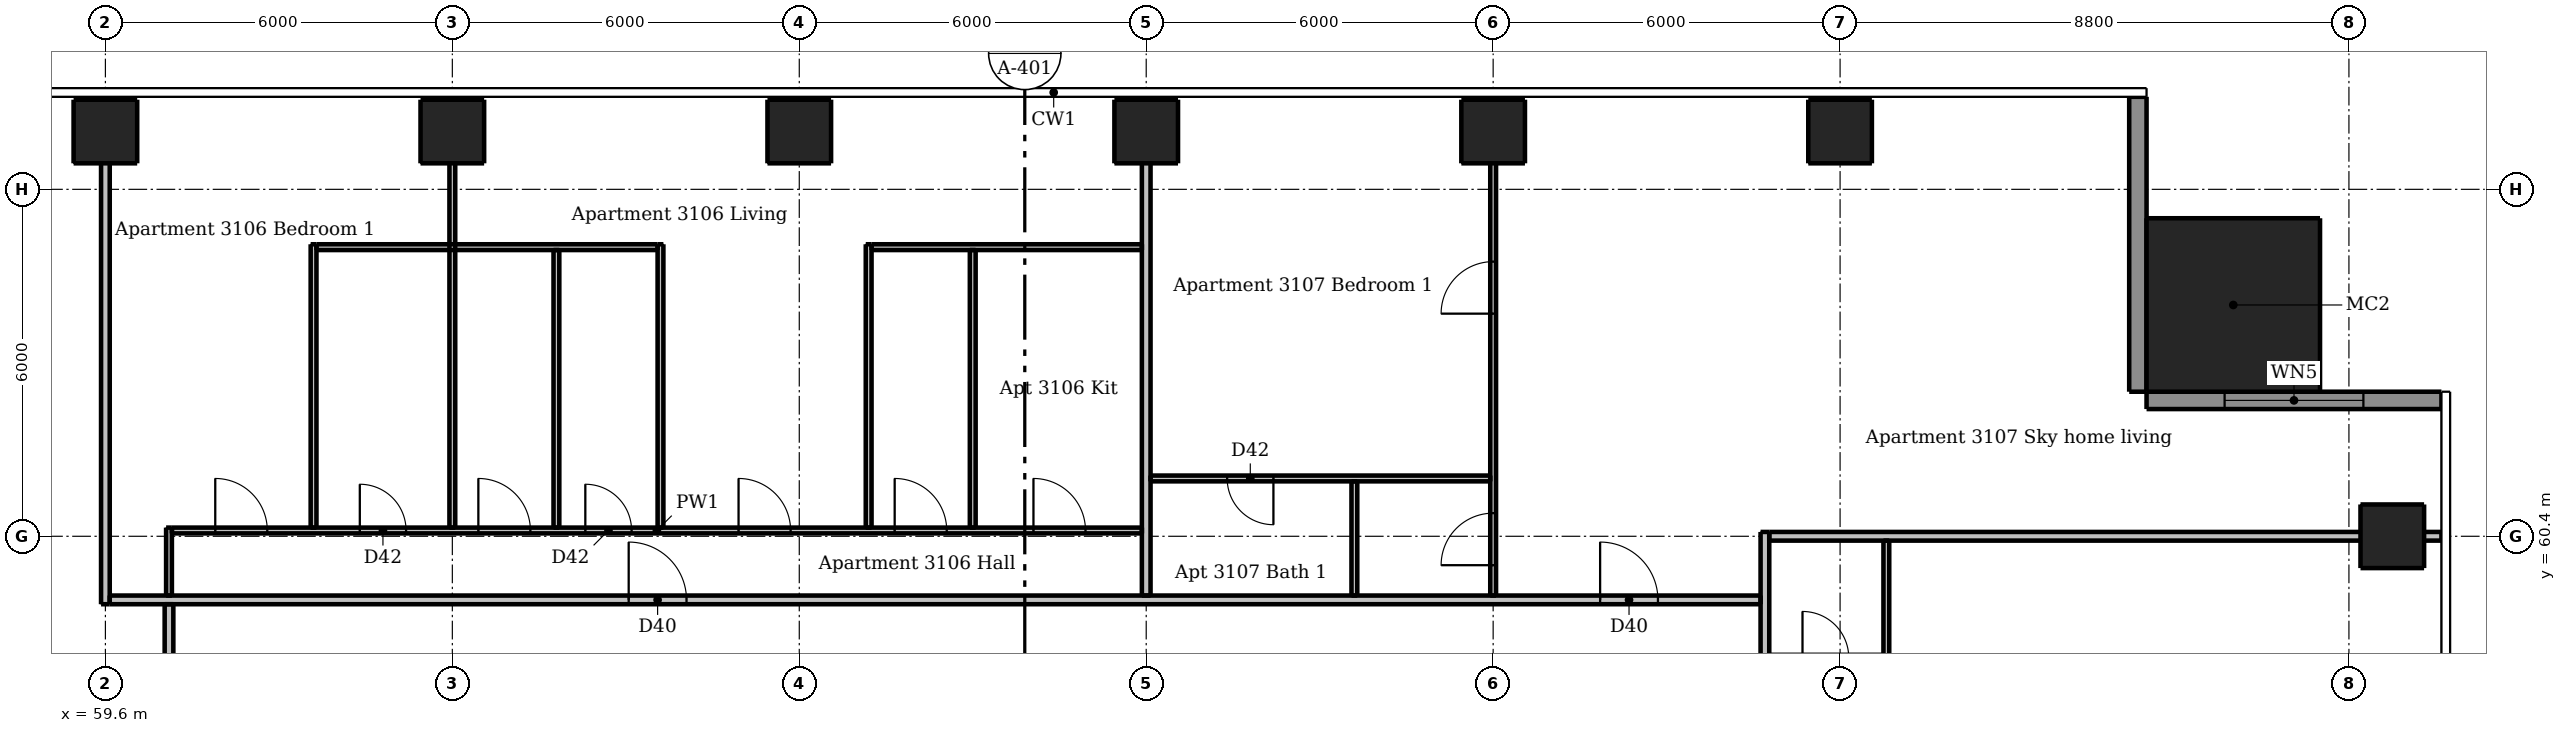
"""IFC4 building model, lengths in metres.
Left out: names, types, materials, properties, quantities, classifications, styles, units other than length and angle.
Written with IfcOpenShell. Run it as: python <this file> out.ifc"""

import sys

from ifc_helpers import new_model, si_unit, direction, frame, frame_2d, origin, origin_2d, place, context, subcontext, project, spatial, rectangle, extrude, element, fill, save


model = new_model("IFC4")
c1 = context("Model", 3, precision=1e-05, world=origin(), true_north=direction((0.0, 1.0)))
c2 = subcontext(c1, "Body", "Model", "MODEL_VIEW")
j1 = project(units=[si_unit("LENGTHUNIT", "METRE"), si_unit("PLANEANGLEUNIT", "RADIAN")], contexts=[c1])
p1 = place(None, origin())
s1 = spatial("IfcSite", under=j1, at=p1, CompositionType="ELEMENT")
p2 = place(p1, origin())
s2 = spatial("IfcBuilding", under=s1, at=p2, CompositionType="ELEMENT")
p3 = place(p2, frame((0.0, 0.0, 115.0)))
s3 = spatial("IfcBuildingStorey", under=s2, at=p3, CompositionType="ELEMENT", Elevation=115.0)
for number, where, z_axis, x_axis in (
    (1, (99.15, 60.4, 0.0), (0.0, 0.0, 1.0), (1.0, 0.0, 0.0)),
    (2, (59.6, 67.4, 0.0), (0.0, 0.0, 1.0), (1.0, 0.0, 0.0)),
    (3, (65.6, 67.4, 0.0), (0.0, 0.0, 1.0), (1.0, 0.0, 0.0)),
    (4, (71.6, 67.4, 0.0), (0.0, 0.0, 1.0), (1.0, 0.0, 0.0)),
    (5, (77.6, 67.4, 0.0), (0.0, 0.0, 1.0), (1.0, 0.0, 0.0)),
    (6, (83.6, 67.4, 0.0), (0.0, 0.0, 1.0), (1.0, 0.0, 0.0)),
    (7, (89.6, 67.4, 0.0), (0.0, 0.0, 1.0), (1.0, 0.0, 0.0)),
):
    element("IfcColumn", number, at=place(p3, frame(where, z_axis=z_axis, x_axis=x_axis)), inside=s3, PredefinedType="COLUMN", context=c2, shape_type="SweptSolid", body=[
        extrude(rectangle(XDim=1.1, YDim=1.1, at=origin_2d()), origin(), (0.0, 0.0, 1.0), 3.05),
    ])
p4 = place(p3, frame((96.4, 64.4, 0.0), z_axis=(0.0, 0.0, 1.0), x_axis=(1.0, 0.0, 0.0)))
e8 = element("IfcColumn", 8, at=p4, inside=s3, PredefinedType="COLUMN", context=c2, shape_type="SweptSolid", body=[
    extrude(rectangle(XDim=3.0, YDim=3.0, at=origin_2d()), origin(), (0.0, 0.0, 1.0), 3.3),
])
p5 = place(p3, frame((100.0, 62.75, 0.0), z_axis=(0.0, 0.0, 1.0), x_axis=(-1.0, 0.0, 0.0)))
e9 = element("IfcWall", 9, at=p5, inside=s3, PredefinedType="SOLIDWALL", context=c2, shape_type="SweptSolid", body=[
    extrude(rectangle(XDim=5.1, YDim=0.3, at=frame_2d((2.55, 0.0))), origin(), (0.0, 0.0, 1.0), 3.05),
])
p6 = place(p5, frame((1.35, 0.0, 0.15)))
e10 = element("IfcOpeningElement", 10, at=p6, cuts=e9, PredefinedType="OPENING", context=c2, shape_type="SweptSolid", body=[
    extrude(rectangle(XDim=2.4, YDim=2.1, at=frame_2d((1.2, 1.05))), frame((0.0, 0.16, 0.0), z_axis=(0.0, -1.0, 0.0), x_axis=(1.0, 0.0, 0.0)), (0.0, 0.0, 1.0), 0.32),
])
p7 = place(p3, frame((94.75, 62.9, 0.0), z_axis=(0.0, 0.0, 1.0), x_axis=(0.0, 1.0, 0.0)))
e11 = element("IfcWall", 11, at=p7, inside=s3, PredefinedType="SOLIDWALL", context=c2, shape_type="SweptSolid", body=[
    extrude(rectangle(XDim=5.1, YDim=0.3, at=frame_2d((2.55, 0.0))), origin(), (0.0, 0.0, 1.0), 3.05),
])
p8 = place(p3, frame((60.7, 59.375, 0.0), z_axis=(0.0, 0.0, 1.0), x_axis=(0.0, 1.0, 0.0)))
e12 = element("IfcWall", 12, at=p8, inside=s3, PredefinedType="PARTITIONING", context=c2, shape_type="SweptSolid", body=[
    extrude(rectangle(XDim=1.175, YDim=0.1, at=frame_2d((0.587, 0.0))), origin(), (0.0, 0.0, 1.0), 3.05),
])
p9 = place(p3, frame((63.2, 60.55, 0.0), z_axis=(0.0, 0.0, 1.0), x_axis=(0.0, 1.0, 0.0)))
e13 = element("IfcWall", 13, at=p9, inside=s3, PredefinedType="PARTITIONING", context=c2, shape_type="SweptSolid", body=[
    extrude(rectangle(XDim=4.9, YDim=0.1, at=frame_2d((2.45, 0.0))), origin(), (0.0, 0.0, 1.0), 3.05),
])
p10 = place(p3, frame((65.6, 60.55, 0.0), z_axis=(0.0, 0.0, 1.0), x_axis=(0.0, 1.0, 0.0)))
e14 = element("IfcWall", 14, at=p10, inside=s3, PredefinedType="PARTITIONING", context=c2, shape_type="SweptSolid", body=[
    extrude(rectangle(XDim=7.45, YDim=0.1, at=frame_2d((3.725, 0.0))), origin(), (0.0, 0.0, 1.0), 2.516),
])
p11 = place(p3, frame((67.4, 60.55, 0.0), z_axis=(0.0, 0.0, 1.0), x_axis=(0.0, 1.0, 0.0)))
e15 = element("IfcWall", 15, at=p11, inside=s3, PredefinedType="PARTITIONING", context=c2, shape_type="SweptSolid", body=[
    extrude(rectangle(XDim=4.8, YDim=0.1, at=frame_2d((2.4, 0.0))), origin(), (0.0, 0.0, 1.0), 3.05),
])
for number, where, z_axis, x_axis in (
    (16, (69.2, 60.55, 0.0), (0.0, 0.0, 1.0), (0.0, 1.0, 0.0)),
    (17, (72.8, 60.55, 0.0), (0.0, 0.0, 1.0), (0.0, 1.0, 0.0)),
):
    element("IfcWall", number, at=place(p3, frame(where, z_axis=z_axis, x_axis=x_axis)), inside=s3, PredefinedType="PARTITIONING", context=c2, shape_type="SweptSolid", body=[
        extrude(rectangle(XDim=4.9, YDim=0.1, at=frame_2d((2.45, 0.0))), origin(), (0.0, 0.0, 1.0), 3.05),
    ])
p12 = place(p3, frame((74.6, 60.55, 0.0), z_axis=(0.0, 0.0, 1.0), x_axis=(0.0, 1.0, 0.0)))
e18 = element("IfcWall", 18, at=p12, inside=s3, PredefinedType="PARTITIONING", context=c2, shape_type="SweptSolid", body=[
    extrude(rectangle(XDim=4.8, YDim=0.1, at=frame_2d((2.4, 0.0))), origin(), (0.0, 0.0, 1.0), 3.05),
])
p13 = place(p3, frame((81.2, 59.375, 0.0), z_axis=(0.0, 0.0, 1.0), x_axis=(0.0, 1.0, 0.0)))
e19 = element("IfcWall", 19, at=p13, inside=s3, PredefinedType="PARTITIONING", context=c2, shape_type="SweptSolid", body=[
    extrude(rectangle(XDim=1.975, YDim=0.1, at=frame_2d((0.988, 0.0))), origin(), (0.0, 0.0, 1.0), 3.05),
])
p14 = place(p3, frame((83.6, 59.375, 0.0), z_axis=(0.0, 0.0, 1.0), x_axis=(0.0, 1.0, 0.0)))
e20 = element("IfcWall", 20, at=p14, inside=s3, PredefinedType="PARTITIONING", context=c2, shape_type="SweptSolid", body=[
    extrude(rectangle(XDim=8.625, YDim=0.1, at=frame_2d((4.312, 0.0))), origin(), (0.0, 0.0, 1.0), 2.516),
])
p15 = place(p14, frame((0.525, 0.0, 0.0)))
e21 = element("IfcOpeningElement", 21, at=p15, cuts=e20, PredefinedType="OPENING", context=c2, shape_type="SweptSolid", body=[
    extrude(rectangle(XDim=0.9, YDim=2.1, at=frame_2d((0.45, 1.05))), frame((0.0, 0.06, 0.0), z_axis=(0.0, -1.0, 0.0), x_axis=(1.0, 0.0, 0.0)), (0.0, 0.0, 1.0), 0.12),
])
p16 = place(p14, frame((4.875, 0.0, 0.0)))
e22 = element("IfcOpeningElement", 22, at=p16, cuts=e20, PredefinedType="OPENING", context=c2, shape_type="SweptSolid", body=[
    extrude(rectangle(XDim=0.9, YDim=2.1, at=frame_2d((0.45, 1.05))), frame((0.0, 0.06, 0.0), z_axis=(0.0, -1.0, 0.0), x_axis=(1.0, 0.0, 0.0)), (0.0, 0.0, 1.0), 0.12),
])
p17 = place(p3, frame((90.4, 58.25, 0.0), z_axis=(0.0, 0.0, 1.0), x_axis=(0.0, 1.0, 0.0)))
e23 = element("IfcWall", 23, at=p17, inside=s3, PredefinedType="PARTITIONING", context=c2, shape_type="SweptSolid", body=[
    extrude(rectangle(XDim=2.075, YDim=0.1, at=frame_2d((1.038, 0.0))), origin(), (0.0, 0.0, 1.0), 3.05),
])
p18 = place(p3, frame((63.25, 65.4, 0.0), z_axis=(0.0, 0.0, 1.0), x_axis=(1.0, 0.0, 0.0)))
e24 = element("IfcWall", 24, at=p18, inside=s3, PredefinedType="PARTITIONING", context=c2, shape_type="SweptSolid", body=[
    extrude(rectangle(XDim=5.9, YDim=0.1, at=frame_2d((2.95, 0.0))), origin(), (0.0, 0.0, 1.0), 3.05),
])
p19 = place(p3, frame((72.85, 65.4, 0.0), z_axis=(0.0, 0.0, 1.0), x_axis=(1.0, 0.0, 0.0)))
e25 = element("IfcWall", 25, at=p19, inside=s3, PredefinedType="PARTITIONING", context=c2, shape_type="SweptSolid", body=[
    extrude(rectangle(XDim=4.675, YDim=0.1, at=frame_2d((2.337, 0.0))), origin(), (0.0, 0.0, 1.0), 3.05),
])
p20 = place(p3, frame((83.55, 61.4, 0.0), z_axis=(0.0, 0.0, 1.0), x_axis=(-1.0, 0.0, 0.0)))
e26 = element("IfcWall", 26, at=p20, inside=s3, PredefinedType="PARTITIONING", context=c2, shape_type="SweptSolid", body=[
    extrude(rectangle(XDim=5.875, YDim=0.1, at=frame_2d((2.938, 0.0))), origin(), (0.0, 0.0, 1.0), 3.05),
])
p21 = place(p20, frame((3.75, 0.0, 0.0)))
e27 = element("IfcOpeningElement", 27, at=p21, cuts=e26, PredefinedType="OPENING", context=c2, shape_type="SweptSolid", body=[
    extrude(rectangle(XDim=0.8, YDim=2.1, at=frame_2d((0.4, 1.05))), frame((0.0, 0.06, 0.0), z_axis=(0.0, -1.0, 0.0), x_axis=(1.0, 0.0, 0.0)), (0.0, 0.0, 1.0), 0.12),
])
p22 = place(p3, frame((60.75, 60.5, 0.0), z_axis=(0.0, 0.0, 1.0), x_axis=(1.0, 0.0, 0.0)))
e28 = element("IfcWall", 28, at=p22, inside=s3, PredefinedType="PARTITIONING", context=c2, shape_type="SweptSolid", body=[
    extrude(rectangle(XDim=16.775, YDim=0.1, at=frame_2d((8.387, 0.0))), origin(), (0.0, 0.0, 1.0), 3.05),
])
p23 = place(p22, frame((9.8, 0.0, 0.0)))
e29 = element("IfcOpeningElement", 29, at=p23, cuts=e28, PredefinedType="OPENING", context=c2, shape_type="SweptSolid", body=[
    extrude(rectangle(XDim=0.9, YDim=2.1, at=frame_2d((0.45, 1.05))), frame((0.0, 0.06, 0.0), z_axis=(0.0, -1.0, 0.0), x_axis=(1.0, 0.0, 0.0)), (0.0, 0.0, 1.0), 0.12),
])
p24 = place(p22, frame((14.9, 0.0, 0.0)))
e30 = element("IfcOpeningElement", 30, at=p24, cuts=e28, PredefinedType="OPENING", context=c2, shape_type="SweptSolid", body=[
    extrude(rectangle(XDim=0.9, YDim=2.1, at=frame_2d((0.45, 1.05))), frame((0.0, 0.06, 0.0), z_axis=(0.0, -1.0, 0.0), x_axis=(1.0, 0.0, 0.0)), (0.0, 0.0, 1.0), 0.12),
])
p25 = place(p22, frame((12.5, 0.0, 0.0)))
e31 = element("IfcOpeningElement", 31, at=p25, cuts=e28, PredefinedType="OPENING", context=c2, shape_type="SweptSolid", body=[
    extrude(rectangle(XDim=0.9, YDim=2.1, at=frame_2d((0.45, 1.05))), frame((0.0, 0.06, 0.0), z_axis=(0.0, -1.0, 0.0), x_axis=(1.0, 0.0, 0.0)), (0.0, 0.0, 1.0), 0.12),
])
p26 = place(p22, frame((5.3, 0.0, 0.0)))
e32 = element("IfcOpeningElement", 32, at=p26, cuts=e28, PredefinedType="OPENING", context=c2, shape_type="SweptSolid", body=[
    extrude(rectangle(XDim=0.9, YDim=2.1, at=frame_2d((0.45, 1.05))), frame((0.0, 0.06, 0.0), z_axis=(0.0, -1.0, 0.0), x_axis=(1.0, 0.0, 0.0)), (0.0, 0.0, 1.0), 0.12),
])
p27 = place(p22, frame((7.15, 0.0, 0.0)))
e33 = element("IfcOpeningElement", 33, at=p27, cuts=e28, PredefinedType="OPENING", context=c2, shape_type="SweptSolid", body=[
    extrude(rectangle(XDim=0.8, YDim=2.1, at=frame_2d((0.4, 1.05))), frame((0.0, 0.06, 0.0), z_axis=(0.0, -1.0, 0.0), x_axis=(1.0, 0.0, 0.0)), (0.0, 0.0, 1.0), 0.12),
])
p28 = place(p22, frame((0.75, 0.0, 0.0)))
e34 = element("IfcOpeningElement", 34, at=p28, cuts=e28, PredefinedType="OPENING", context=c2, shape_type="SweptSolid", body=[
    extrude(rectangle(XDim=0.9, YDim=2.1, at=frame_2d((0.45, 1.05))), frame((0.0, 0.06, 0.0), z_axis=(0.0, -1.0, 0.0), x_axis=(1.0, 0.0, 0.0)), (0.0, 0.0, 1.0), 0.12),
])
p29 = place(p22, frame((3.25, 0.0, 0.0)))
e35 = element("IfcOpeningElement", 35, at=p29, cuts=e28, PredefinedType="OPENING", context=c2, shape_type="SweptSolid", body=[
    extrude(rectangle(XDim=0.8, YDim=2.1, at=frame_2d((0.4, 1.05))), frame((0.0, 0.06, 0.0), z_axis=(0.0, -1.0, 0.0), x_axis=(1.0, 0.0, 0.0)), (0.0, 0.0, 1.0), 0.12),
])
p30 = place(p3, frame((59.6, 59.225, 0.0), z_axis=(0.0, 0.0, 1.0), x_axis=(0.0, 1.0, 0.0)))
e36 = element("IfcWall", 36, at=p30, inside=s3, PredefinedType="PARTITIONING", context=c2, shape_type="SweptSolid", body=[
    extrude(rectangle(XDim=8.775, YDim=0.15, at=frame_2d((4.387, 0.0))), origin(), (0.0, 0.0, 1.0), 2.51),
])
p31 = place(p3, frame((60.7, 30.325, 0.0), z_axis=(0.0, 0.0, 1.0), x_axis=(0.0, 1.0, 0.0)))
e37 = element("IfcWall", 37, at=p31, inside=s3, PredefinedType="PARTITIONING", context=c2, shape_type="SweptSolid", body=[
    extrude(rectangle(XDim=28.9, YDim=0.15, at=frame_2d((14.45, 0.0))), origin(), (0.0, 0.0, 1.0), 3.05),
])
p32 = place(p31, frame((9.225, 0.0, 0.0)))
e38 = element("IfcOpeningElement", 38, at=p32, cuts=e37, PredefinedType="OPENING", context=c2, shape_type="SweptSolid", body=[
    extrude(rectangle(XDim=1.0, YDim=2.1, at=frame_2d((0.5, 1.05))), frame((0.0, 0.085, 0.0), z_axis=(0.0, -1.0, 0.0), x_axis=(1.0, 0.0, 0.0)), (0.0, 0.0, 1.0), 0.17),
])
p33 = place(p31, frame((26.025, 0.0, 0.0)))
e39 = element("IfcOpeningElement", 39, at=p33, cuts=e37, PredefinedType="OPENING", context=c2, shape_type="SweptSolid", body=[
    extrude(rectangle(XDim=1.0, YDim=2.1, at=frame_2d((0.5, 1.05))), frame((0.0, 0.085, 0.0), z_axis=(0.0, -1.0, 0.0), x_axis=(1.0, 0.0, 0.0)), (0.0, 0.0, 1.0), 0.17),
])
p34 = place(p3, frame((77.6, 59.375, 0.0), z_axis=(0.0, 0.0, 1.0), x_axis=(0.0, 1.0, 0.0)))
e40 = element("IfcWall", 40, at=p34, inside=s3, PredefinedType="PARTITIONING", context=c2, shape_type="SweptSolid", body=[
    extrude(rectangle(XDim=8.625, YDim=0.15, at=frame_2d((4.312, 0.0))), origin(), (0.0, 0.0, 1.0), 2.516),
])
p35 = place(p3, frame((88.3, 60.475, 0.0), z_axis=(0.0, 0.0, 1.0), x_axis=(0.0, -1.0, 0.0)))
e41 = element("IfcWall", 41, at=p35, inside=s3, PredefinedType="PARTITIONING", context=c2, shape_type="SweptSolid", body=[
    extrude(rectangle(XDim=28.7, YDim=0.15, at=frame_2d((14.35, 0.0))), origin(), (0.0, 0.0, 1.0), 3.05),
])
p36 = place(p35, frame((27.425, 0.0, 0.0)))
e42 = element("IfcOpeningElement", 42, at=p36, cuts=e41, PredefinedType="OPENING", context=c2, shape_type="SweptSolid", body=[
    extrude(rectangle(XDim=1.0, YDim=2.1, at=frame_2d((0.5, 1.05))), frame((0.0, 0.085, 0.0), z_axis=(0.0, -1.0, 0.0), x_axis=(1.0, 0.0, 0.0)), (0.0, 0.0, 1.0), 0.17),
])
p37 = place(p35, frame((13.075, 0.0, 0.0)))
e43 = element("IfcOpeningElement", 43, at=p37, cuts=e41, PredefinedType="OPENING", context=c2, shape_type="SweptSolid", body=[
    extrude(rectangle(XDim=1.0, YDim=2.1, at=frame_2d((0.5, 1.05))), frame((0.0, 0.085, 0.0), z_axis=(0.0, -1.0, 0.0), x_axis=(1.0, 0.0, 0.0)), (0.0, 0.0, 1.0), 0.17),
])
p38 = place(p35, frame((2.575, 0.0, 0.0)))
e44 = element("IfcOpeningElement", 44, at=p38, cuts=e41, PredefinedType="OPENING", context=c2, shape_type="SweptSolid", body=[
    extrude(rectangle(XDim=1.0, YDim=2.1, at=frame_2d((0.5, 1.05))), frame((0.0, 0.085, 0.0), z_axis=(0.0, -1.0, 0.0), x_axis=(1.0, 0.0, 0.0)), (0.0, 0.0, 1.0), 0.17),
])
p39 = place(p3, frame((88.375, 60.4, 0.0), z_axis=(0.0, 0.0, 1.0), x_axis=(1.0, 0.0, 0.0)))
e45 = element("IfcWall", 45, at=p39, inside=s3, PredefinedType="PARTITIONING", context=c2, shape_type="SweptSolid", body=[
    extrude(rectangle(XDim=11.625, YDim=0.15, at=frame_2d((5.812, 0.0))), origin(), (0.0, 0.0, 1.0), 2.516),
])
p40 = place(p3, frame((59.675, 59.3, 0.0), z_axis=(0.0, 0.0, 1.0), x_axis=(1.0, 0.0, 0.0)))
e46 = element("IfcWall", 46, at=p40, inside=s3, PredefinedType="PARTITIONING", context=c2, shape_type="SweptSolid", body=[
    extrude(rectangle(XDim=28.55, YDim=0.15, at=frame_2d((14.275, 0.0))), origin(), (0.0, 0.0, 1.0), 3.05),
])
p41 = place(p40, frame((8.975, 0.0, 0.0)))
e47 = element("IfcOpeningElement", 47, at=p41, cuts=e46, PredefinedType="OPENING", context=c2, shape_type="SweptSolid", body=[
    extrude(rectangle(XDim=1.0, YDim=2.1, at=frame_2d((0.5, 1.05))), frame((0.0, 0.085, 0.0), z_axis=(0.0, -1.0, 0.0), x_axis=(1.0, 0.0, 0.0)), (0.0, 0.0, 1.0), 0.17),
])
p42 = place(p40, frame((25.775, 0.0, 0.0)))
e48 = element("IfcOpeningElement", 48, at=p42, cuts=e46, PredefinedType="OPENING", context=c2, shape_type="SweptSolid", body=[
    extrude(rectangle(XDim=1.0, YDim=2.1, at=frame_2d((0.5, 1.05))), frame((0.0, 0.085, 0.0), z_axis=(0.0, -1.0, 0.0), x_axis=(1.0, 0.0, 0.0)), (0.0, 0.0, 1.0), 0.17),
])
p43 = place(p6, origin())
e49 = element("IfcWindow", 49, at=p43, inside=s3, PartitioningType="DOUBLE_PANEL_VERTICAL", PredefinedType="WINDOW", context=c2, shape_type="SweptSolid", body=[
    extrude(rectangle(XDim=2.4, YDim=2.1, at=frame_2d((1.2, 1.05))), frame((0.0, 0.03, 0.0), z_axis=(0.0, -1.0, 0.0), x_axis=(1.0, 0.0, 0.0)), (0.0, 0.0, 1.0), 0.06),
])
fill(e10, e49)
p44 = place(p41, origin())
e50 = element("IfcDoor", 50, at=p44, inside=s3, OperationType="SINGLE_SWING_LEFT", PredefinedType="DOOR", context=c2, shape_type="SweptSolid", body=[
    extrude(rectangle(XDim=1.0, YDim=2.1, at=frame_2d((0.5, 1.05))), frame((0.0, 0.025, 0.0), z_axis=(0.0, -1.0, 0.0), x_axis=(1.0, 0.0, 0.0)), (0.0, 0.0, 1.0), 0.05),
])
fill(e47, e50)
p45 = place(p23, origin())
e51 = element("IfcDoor", 51, at=p45, inside=s3, OperationType="SINGLE_SWING_LEFT", PredefinedType="DOOR", context=c2, shape_type="SweptSolid", body=[
    extrude(rectangle(XDim=0.9, YDim=2.1, at=frame_2d((0.45, 1.05))), frame((0.0, 0.025, 0.0), z_axis=(0.0, -1.0, 0.0), x_axis=(1.0, 0.0, 0.0)), (0.0, 0.0, 1.0), 0.05),
])
fill(e29, e51)
p46 = place(p24, origin())
e52 = element("IfcDoor", 52, at=p46, inside=s3, OperationType="SINGLE_SWING_LEFT", PredefinedType="DOOR", context=c2, shape_type="SweptSolid", body=[
    extrude(rectangle(XDim=0.9, YDim=2.1, at=frame_2d((0.45, 1.05))), frame((0.0, 0.025, 0.0), z_axis=(0.0, -1.0, 0.0), x_axis=(1.0, 0.0, 0.0)), (0.0, 0.0, 1.0), 0.05),
])
fill(e30, e52)
p47 = place(p25, origin())
e53 = element("IfcDoor", 53, at=p47, inside=s3, OperationType="SINGLE_SWING_LEFT", PredefinedType="DOOR", context=c2, shape_type="SweptSolid", body=[
    extrude(rectangle(XDim=0.9, YDim=2.1, at=frame_2d((0.45, 1.05))), frame((0.0, 0.025, 0.0), z_axis=(0.0, -1.0, 0.0), x_axis=(1.0, 0.0, 0.0)), (0.0, 0.0, 1.0), 0.05),
])
fill(e31, e53)
p48 = place(p26, origin())
e54 = element("IfcDoor", 54, at=p48, inside=s3, OperationType="SINGLE_SWING_LEFT", PredefinedType="DOOR", context=c2, shape_type="SweptSolid", body=[
    extrude(rectangle(XDim=0.9, YDim=2.1, at=frame_2d((0.45, 1.05))), frame((0.0, 0.025, 0.0), z_axis=(0.0, -1.0, 0.0), x_axis=(1.0, 0.0, 0.0)), (0.0, 0.0, 1.0), 0.05),
])
fill(e32, e54)
p49 = place(p27, origin())
e55 = element("IfcDoor", 55, at=p49, inside=s3, OperationType="SINGLE_SWING_LEFT", PredefinedType="DOOR", context=c2, shape_type="SweptSolid", body=[
    extrude(rectangle(XDim=0.8, YDim=2.1, at=frame_2d((0.4, 1.05))), frame((0.0, 0.025, 0.0), z_axis=(0.0, -1.0, 0.0), x_axis=(1.0, 0.0, 0.0)), (0.0, 0.0, 1.0), 0.05),
])
fill(e33, e55)
p50 = place(p28, origin())
e56 = element("IfcDoor", 56, at=p50, inside=s3, OperationType="SINGLE_SWING_LEFT", PredefinedType="DOOR", context=c2, shape_type="SweptSolid", body=[
    extrude(rectangle(XDim=0.9, YDim=2.1, at=frame_2d((0.45, 1.05))), frame((0.0, 0.025, 0.0), z_axis=(0.0, -1.0, 0.0), x_axis=(1.0, 0.0, 0.0)), (0.0, 0.0, 1.0), 0.05),
])
fill(e34, e56)
p51 = place(p29, origin())
e57 = element("IfcDoor", 57, at=p51, inside=s3, OperationType="SINGLE_SWING_LEFT", PredefinedType="DOOR", context=c2, shape_type="SweptSolid", body=[
    extrude(rectangle(XDim=0.8, YDim=2.1, at=frame_2d((0.4, 1.05))), frame((0.0, 0.025, 0.0), z_axis=(0.0, -1.0, 0.0), x_axis=(1.0, 0.0, 0.0)), (0.0, 0.0, 1.0), 0.05),
])
fill(e35, e57)
p52 = place(p42, origin())
e58 = element("IfcDoor", 58, at=p52, inside=s3, OperationType="SINGLE_SWING_LEFT", PredefinedType="DOOR", context=c2, shape_type="SweptSolid", body=[
    extrude(rectangle(XDim=1.0, YDim=2.1, at=frame_2d((0.5, 1.05))), frame((0.0, 0.025, 0.0), z_axis=(0.0, -1.0, 0.0), x_axis=(1.0, 0.0, 0.0)), (0.0, 0.0, 1.0), 0.05),
])
fill(e48, e58)
p53 = place(p15, origin())
e59 = element("IfcDoor", 59, at=p53, inside=s3, OperationType="SINGLE_SWING_LEFT", PredefinedType="DOOR", context=c2, shape_type="SweptSolid", body=[
    extrude(rectangle(XDim=0.9, YDim=2.1, at=frame_2d((0.45, 1.05))), frame((0.0, 0.025, 0.0), z_axis=(0.0, -1.0, 0.0), x_axis=(1.0, 0.0, 0.0)), (0.0, 0.0, 1.0), 0.05),
])
fill(e21, e59)
p54 = place(p16, origin())
e60 = element("IfcDoor", 60, at=p54, inside=s3, OperationType="SINGLE_SWING_LEFT", PredefinedType="DOOR", context=c2, shape_type="SweptSolid", body=[
    extrude(rectangle(XDim=0.9, YDim=2.1, at=frame_2d((0.45, 1.05))), frame((0.0, 0.025, 0.0), z_axis=(0.0, -1.0, 0.0), x_axis=(1.0, 0.0, 0.0)), (0.0, 0.0, 1.0), 0.05),
])
fill(e22, e60)
p55 = place(p21, origin())
e61 = element("IfcDoor", 61, at=p55, inside=s3, OperationType="SINGLE_SWING_LEFT", PredefinedType="DOOR", context=c2, shape_type="SweptSolid", body=[
    extrude(rectangle(XDim=0.8, YDim=2.1, at=frame_2d((0.4, 1.05))), frame((0.0, 0.025, 0.0), z_axis=(0.0, -1.0, 0.0), x_axis=(1.0, 0.0, 0.0)), (0.0, 0.0, 1.0), 0.05),
])
fill(e27, e61)
save(model, sys.argv[1])
